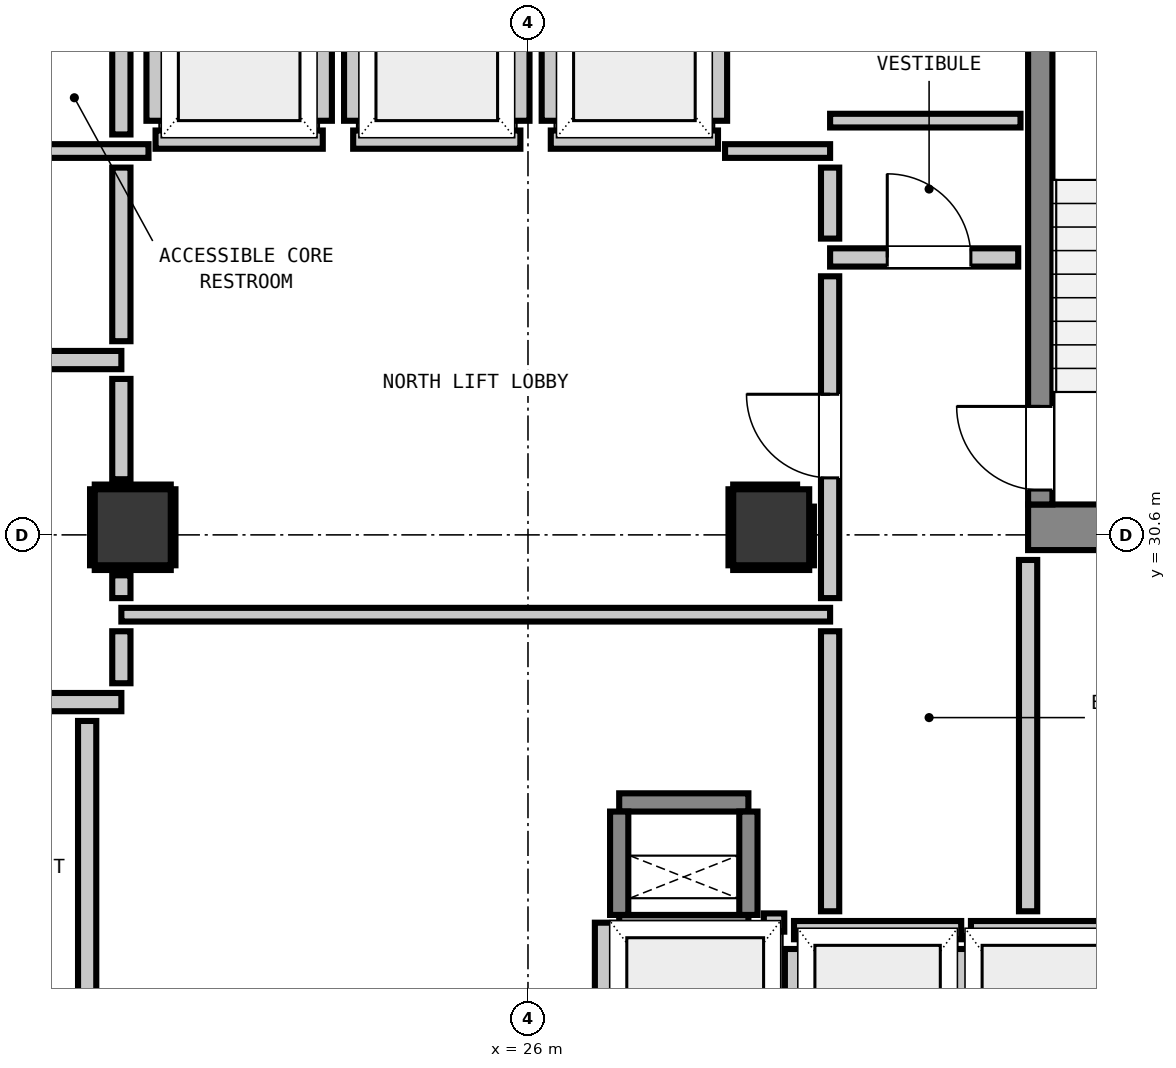
"""IFC4 building model, lengths in metres.
Left out: names, types, materials, properties, quantities, classifications, styles, units other than length and angle.
Written with IfcOpenShell. Run it as: python <this file> out.ifc"""

import sys

from ifc_helpers import new_model, si_unit, direction, frame, frame_2d, origin, origin_2d, place, context, subcontext, project, spatial, rectangle, extrude, element, fill, save


model = new_model("IFC4")
c1 = context("Model", 3, precision=1e-05, world=origin(), true_north=direction((0.0, 1.0)))
c2 = subcontext(c1, "Body", "Model", "MODEL_VIEW")
j1 = project(units=[si_unit("LENGTHUNIT", "METRE"), si_unit("PLANEANGLEUNIT", "RADIAN")], contexts=[c1])
p1 = place(None, origin())
s1 = spatial("IfcSite", under=j1, at=p1, CompositionType="ELEMENT")
p2 = place(p1, origin())
s2 = spatial("IfcBuilding", under=s1, at=p2, CompositionType="ELEMENT")
p3 = place(p2, frame((0.0, 0.0, 55.2)))
s3 = spatial("IfcBuildingStorey", under=s2, at=p3, CompositionType="ELEMENT", Elevation=55.2)
p4 = place(p3, frame((32.58, 30.7, 0.0), z_axis=(0.0, 0.0, 1.0), x_axis=(1.0, 0.0, 0.0)))
e1 = element("IfcWall", 1, at=p4, inside=s3, PredefinedType="SHEAR", context=c2, shape_type="SweptSolid", body=[
    extrude(rectangle(XDim=3.415, YDim=0.6, at=frame_2d((1.708, 0.0))), origin(), (0.0, 0.0, 1.0), 3.32),
])
p5 = place(p3, frame((32.74, 31.0, 0.0), z_axis=(0.0, 0.0, 1.0), x_axis=(0.0, 1.0, 0.0)))
e2 = element("IfcWall", 2, at=p5, inside=s3, PredefinedType="SHEAR", context=c2, shape_type="SweptSolid", body=[
    extrude(rectangle(XDim=7.8, YDim=0.32, at=frame_2d((3.9, 0.0))), origin(), (0.0, 0.0, 1.0), 3.32),
])
p6 = place(p5, frame((0.19, 0.0, 0.0)))
e3 = element("IfcOpeningElement", 3, at=p6, cuts=e2, PredefinedType="OPENING", context=c2, shape_type="SweptSolid", body=[
    extrude(rectangle(XDim=1.1, YDim=2.15, at=frame_2d((0.55, 1.075))), frame((0.0, 0.17, 0.0), z_axis=(0.0, -1.0, 0.0), x_axis=(1.0, 0.0, 0.0)), (0.0, 0.0, 1.0), 0.34),
])
for number, where, z_axis, x_axis in (
    (4, (27.2, 25.48, 0.0), (0.0, 0.0, 1.0), (1.0, 0.0, 0.0)),
    (5, (27.2, 27.08, 0.0), (0.0, 0.0, 1.0), (1.0, 0.0, 0.0)),
):
    element("IfcWall", number, at=place(p3, frame(where, z_axis=z_axis, x_axis=x_axis)), inside=s3, PredefinedType="SHEAR", context=c2, shape_type="SweptSolid", body=[
        extrude(rectangle(XDim=1.7, YDim=0.24, at=frame_2d((0.85, 0.0))), origin(), (0.0, 0.0, 1.0), 3.32),
    ])
for number, where, z_axis, x_axis in (
    (6, (27.2, 25.6, 0.0), (0.0, 0.0, 1.0), (0.0, 1.0, 0.0)),
    (7, (28.9, 25.6, 0.0), (0.0, 0.0, 1.0), (0.0, 1.0, 0.0)),
):
    element("IfcWall", number, at=place(p3, frame(where, z_axis=z_axis, x_axis=x_axis)), inside=s3, PredefinedType="SHEAR", context=c2, shape_type="SweptSolid", body=[
        extrude(rectangle(XDim=1.36, YDim=0.24, at=frame_2d((0.68, 0.0))), origin(), (0.0, 0.0, 1.0), 3.32),
    ])
for number, where, z_axis, x_axis in (
    (8, (20.8, 30.7, 0.0), (0.0, 0.0, 1.0), (1.0, 0.0, 0.0)),
    (9, (29.2, 30.7, 0.0), (0.0, 0.0, 1.0), (1.0, 0.0, 0.0)),
):
    element("IfcColumn", number, at=place(p3, frame(where, z_axis=z_axis, x_axis=x_axis)), inside=s3, PredefinedType="COLUMN", context=c2, shape_type="SweptSolid", body=[
        extrude(rectangle(XDim=1.0, YDim=1.0, at=origin_2d()), origin(), (0.0, 0.0, 1.0), 3.32),
    ])
p7 = place(p3, frame((21.1, 35.8, 0.0), z_axis=(0.0, 0.0, 1.0), x_axis=(1.0, 0.0, 0.0)))
e10 = element("IfcWall", 10, at=p7, inside=s3, PredefinedType="PARTITIONING", context=c2, shape_type="SweptSolid", body=[
    extrude(rectangle(XDim=2.2, YDim=0.24, at=frame_2d((1.1, 0.0))), origin(), (0.0, 0.0, 1.0), 3.06),
])
p8 = place(p3, frame((21.1, 36.048, 0.0), z_axis=(0.0, 0.0, 1.0), x_axis=(0.0, 1.0, 0.0)))
e11 = element("IfcWall", 11, at=p8, inside=s3, PredefinedType="PARTITIONING", context=c2, shape_type="SweptSolid", body=[
    extrude(rectangle(XDim=2.104, YDim=0.24, at=frame_2d((1.052, 0.0))), origin(), (0.0, 0.0, 1.0), 2.295),
])
p9 = place(p3, frame((23.3, 36.048, 0.0), z_axis=(0.0, 0.0, 1.0), x_axis=(0.0, 1.0, 0.0)))
e12 = element("IfcWall", 12, at=p9, inside=s3, PredefinedType="PARTITIONING", context=c2, shape_type="SweptSolid", body=[
    extrude(rectangle(XDim=2.104, YDim=0.24, at=frame_2d((1.052, 0.0))), origin(), (0.0, 0.0, 1.0), 3.06),
])
p10 = place(p3, frame((23.7, 35.8, 0.0), z_axis=(0.0, 0.0, 1.0), x_axis=(1.0, 0.0, 0.0)))
e13 = element("IfcWall", 13, at=p10, inside=s3, PredefinedType="PARTITIONING", context=c2, shape_type="SweptSolid", body=[
    extrude(rectangle(XDim=2.2, YDim=0.24, at=frame_2d((1.1, 0.0))), origin(), (0.0, 0.0, 1.0), 3.06),
])
for number, where, z_axis, x_axis in (
    (14, (23.7, 36.048, 0.0), (0.0, 0.0, 1.0), (0.0, 1.0, 0.0)),
    (15, (25.9, 36.048, 0.0), (0.0, 0.0, 1.0), (0.0, 1.0, 0.0)),
):
    element("IfcWall", number, at=place(p3, frame(where, z_axis=z_axis, x_axis=x_axis)), inside=s3, PredefinedType="PARTITIONING", context=c2, shape_type="SweptSolid", body=[
        extrude(rectangle(XDim=2.104, YDim=0.24, at=frame_2d((1.052, 0.0))), origin(), (0.0, 0.0, 1.0), 3.06),
    ])
p11 = place(p3, frame((26.3, 35.8, 0.0), z_axis=(0.0, 0.0, 1.0), x_axis=(1.0, 0.0, 0.0)))
e16 = element("IfcWall", 16, at=p11, inside=s3, PredefinedType="PARTITIONING", context=c2, shape_type="SweptSolid", body=[
    extrude(rectangle(XDim=2.2, YDim=0.24, at=frame_2d((1.1, 0.0))), origin(), (0.0, 0.0, 1.0), 3.06),
])
for number, where, z_axis, x_axis in (
    (17, (26.3, 36.048, 0.0), (0.0, 0.0, 1.0), (0.0, 1.0, 0.0)),
    (18, (28.5, 36.048, 0.0), (0.0, 0.0, 1.0), (0.0, 1.0, 0.0)),
):
    element("IfcWall", number, at=place(p3, frame(where, z_axis=z_axis, x_axis=x_axis)), inside=s3, PredefinedType="PARTITIONING", context=c2, shape_type="SweptSolid", body=[
        extrude(rectangle(XDim=2.104, YDim=0.24, at=frame_2d((1.052, 0.0))), origin(), (0.0, 0.0, 1.0), 3.06),
    ])
p12 = place(p3, frame((29.5, 25.4, 0.0), z_axis=(0.0, 0.0, 1.0), x_axis=(1.0, 0.0, 0.0)))
e19 = element("IfcWall", 19, at=p12, inside=s3, PredefinedType="PARTITIONING", context=c2, shape_type="SweptSolid", body=[
    extrude(rectangle(XDim=2.2, YDim=0.24, at=frame_2d((1.1, 0.0))), origin(), (0.0, 0.0, 1.0), 3.06),
])
p13 = place(p3, frame((29.5, 22.632, 0.0), z_axis=(0.0, 0.0, 1.0), x_axis=(0.0, 1.0, 0.0)))
e20 = element("IfcWall", 20, at=p13, inside=s3, PredefinedType="PARTITIONING", context=c2, shape_type="SweptSolid", body=[
    extrude(rectangle(XDim=2.52, YDim=0.24, at=frame_2d((1.26, 0.0))), origin(), (0.0, 0.0, 1.0), 2.295),
])
p14 = place(p3, frame((31.7, 22.73, 0.0), z_axis=(0.0, 0.0, 1.0), x_axis=(0.0, 1.0, 0.0)))
e21 = element("IfcWall", 21, at=p14, inside=s3, PredefinedType="PARTITIONING", context=c2, shape_type="SweptSolid", body=[
    extrude(rectangle(XDim=2.422, YDim=0.24, at=frame_2d((1.211, 0.0))), origin(), (0.0, 0.0, 1.0), 3.06),
])
p15 = place(p3, frame((31.828, 25.4, 0.0), z_axis=(0.0, 0.0, 1.0), x_axis=(1.0, 0.0, 0.0)))
e22 = element("IfcWall", 22, at=p15, inside=s3, PredefinedType="PARTITIONING", context=c2, shape_type="SweptSolid", body=[
    extrude(rectangle(XDim=2.072, YDim=0.24, at=frame_2d((1.036, 0.0))), origin(), (0.0, 0.0, 1.0), 3.06),
])
p16 = place(p3, frame((29.103, 25.5, 0.0), z_axis=(0.0, 0.0, 1.0), x_axis=(1.0, 0.0, 0.0)))
e23 = element("IfcWall", 23, at=p16, inside=s3, PredefinedType="PARTITIONING", context=c2, shape_type="SweptSolid", body=[
    extrude(rectangle(XDim=0.269, YDim=0.24, at=frame_2d((0.135, 0.0))), origin(), (0.0, 0.0, 1.0), 3.06),
])
p17 = place(p3, frame((27.0, 22.73, 0.0), z_axis=(0.0, 0.0, 1.0), x_axis=(0.0, 1.0, 0.0)))
e24 = element("IfcWall", 24, at=p17, inside=s3, PredefinedType="PARTITIONING", context=c2, shape_type="SweptSolid", body=[
    extrude(rectangle(XDim=2.768, YDim=0.24, at=frame_2d((1.384, 0.0))), origin(), (0.0, 0.0, 1.0), 3.06),
])
p18 = place(p3, frame((17.45, 28.4, 0.0), z_axis=(0.0, 0.0, 1.0), x_axis=(1.0, 0.0, 0.0)))
e25 = element("IfcWall", 25, at=p18, inside=s3, PredefinedType="PARTITIONING", context=c2, shape_type="SweptSolid", body=[
    extrude(rectangle(XDim=3.2, YDim=0.24, at=frame_2d((1.6, 0.0))), origin(), (0.0, 0.0, 1.0), 3.06),
])
p19 = place(p18, frame((0.784, 0.0, 0.0)))
e26 = element("IfcOpeningElement", 26, at=p19, cuts=e25, PredefinedType="OPENING", context=c2, shape_type="SweptSolid", body=[
    extrude(rectangle(XDim=1.1, YDim=2.15, at=frame_2d((0.55, 1.075))), frame((0.0, 0.13, 0.0), z_axis=(0.0, -1.0, 0.0), x_axis=(1.0, 0.0, 0.0)), (0.0, 0.0, 1.0), 0.26),
])
p20 = place(p3, frame((17.45, 32.9, 0.0), z_axis=(0.0, 0.0, 1.0), x_axis=(1.0, 0.0, 0.0)))
e27 = element("IfcWall", 27, at=p20, inside=s3, PredefinedType="PARTITIONING", context=c2, shape_type="SweptSolid", body=[
    extrude(rectangle(XDim=3.2, YDim=0.24, at=frame_2d((1.6, 0.0))), origin(), (0.0, 0.0, 1.0), 3.06),
])
p21 = place(p20, frame((0.159, 0.0, 0.0)))
e28 = element("IfcOpeningElement", 28, at=p21, cuts=e27, PredefinedType="OPENING", context=c2, shape_type="SweptSolid", body=[
    extrude(rectangle(XDim=1.1, YDim=2.15, at=frame_2d((0.55, 1.075))), frame((0.0, 0.13, 0.0), z_axis=(0.0, -1.0, 0.0), x_axis=(1.0, 0.0, 0.0)), (0.0, 0.0, 1.0), 0.26),
])
p22 = place(p3, frame((29.975, 34.25, 0.0), z_axis=(0.0, 0.0, 1.0), x_axis=(1.0, 0.0, 0.0)))
e29 = element("IfcWall", 29, at=p22, inside=s3, PredefinedType="PARTITIONING", context=c2, shape_type="SweptSolid", body=[
    extrude(rectangle(XDim=2.475, YDim=0.24, at=frame_2d((1.237, 0.0))), origin(), (0.0, 0.0, 1.0), 3.06),
])
p23 = place(p22, frame((0.752, 0.0, 0.0)))
e30 = element("IfcOpeningElement", 30, at=p23, cuts=e29, PredefinedType="OPENING", context=c2, shape_type="SweptSolid", body=[
    extrude(rectangle(XDim=1.1, YDim=2.15, at=frame_2d((0.55, 1.075))), frame((0.0, 0.13, 0.0), z_axis=(0.0, -1.0, 0.0), x_axis=(1.0, 0.0, 0.0)), (0.0, 0.0, 1.0), 0.26),
])
p24 = place(p3, frame((20.65, 29.55, 0.0), z_axis=(0.0, 0.0, 1.0), x_axis=(1.0, 0.0, 0.0)))
e31 = element("IfcWall", 31, at=p24, inside=s3, PredefinedType="PARTITIONING", context=c2, shape_type="SweptSolid", body=[
    extrude(rectangle(XDim=9.325, YDim=0.18, at=frame_2d((4.663, 0.0))), origin(), (0.0, 0.0, 1.0), 3.06),
])
p25 = place(p3, frame((18.95, 35.65, 0.0), z_axis=(0.0, 0.0, 1.0), x_axis=(1.0, 0.0, 0.0)))
e32 = element("IfcWall", 32, at=p25, inside=s3, PredefinedType="PARTITIONING", context=c2, shape_type="SweptSolid", body=[
    extrude(rectangle(XDim=2.057, YDim=0.18, at=frame_2d((1.029, 0.0))), origin(), (0.0, 0.0, 1.0), 3.06),
])
p26 = place(p3, frame((28.593, 35.65, 0.0), z_axis=(0.0, 0.0, 1.0), x_axis=(1.0, 0.0, 0.0)))
e33 = element("IfcWall", 33, at=p26, inside=s3, PredefinedType="PARTITIONING", context=c2, shape_type="SweptSolid", body=[
    extrude(rectangle(XDim=1.382, YDim=0.18, at=frame_2d((0.691, 0.0))), origin(), (0.0, 0.0, 1.0), 3.06),
])
p27 = place(p3, frame((29.975, 36.05, 0.0), z_axis=(0.0, 0.0, 1.0), x_axis=(1.0, 0.0, 0.0)))
e34 = element("IfcWall", 34, at=p27, inside=s3, PredefinedType="PARTITIONING", context=c2, shape_type="SweptSolid", body=[
    extrude(rectangle(XDim=2.505, YDim=0.18, at=frame_2d((1.252, 0.0))), origin(), (0.0, 0.0, 1.0), 3.06),
])
p28 = place(p3, frame((20.2, 22.586, 0.0), z_axis=(0.0, 0.0, 1.0), x_axis=(0.0, 1.0, 0.0)))
e35 = element("IfcWall", 35, at=p28, inside=s3, PredefinedType="PARTITIONING", context=c2, shape_type="SweptSolid", body=[
    extrude(rectangle(XDim=5.566, YDim=0.24, at=frame_2d((2.783, 0.0))), origin(), (0.0, 0.0, 1.0), 3.06),
])
p29 = place(p3, frame((20.65, 28.648, 0.0), z_axis=(0.0, 0.0, 1.0), x_axis=(0.0, 1.0, 0.0)))
e36 = element("IfcWall", 36, at=p29, inside=s3, PredefinedType="PARTITIONING", context=c2, shape_type="SweptSolid", body=[
    extrude(rectangle(XDim=0.684, YDim=0.24, at=frame_2d((0.342, 0.0))), origin(), (0.0, 0.0, 1.0), 2.295),
])
p30 = place(p3, frame((20.65, 29.768, 0.0), z_axis=(0.0, 0.0, 1.0), x_axis=(0.0, 1.0, 0.0)))
e37 = element("IfcWall", 37, at=p30, inside=s3, PredefinedType="PARTITIONING", context=c2, shape_type="SweptSolid", body=[
    extrude(rectangle(XDim=0.3, YDim=0.24, at=frame_2d((0.15, 0.0))), origin(), (0.0, 0.0, 1.0), 2.295),
])
p31 = place(p3, frame((20.65, 31.332, 0.0), z_axis=(0.0, 0.0, 1.0), x_axis=(0.0, 1.0, 0.0)))
e38 = element("IfcWall", 38, at=p31, inside=s3, PredefinedType="PARTITIONING", context=c2, shape_type="SweptSolid", body=[
    extrude(rectangle(XDim=1.32, YDim=0.24, at=frame_2d((0.66, 0.0))), origin(), (0.0, 0.0, 1.0), 2.295),
])
p32 = place(p3, frame((20.65, 33.148, 0.0), z_axis=(0.0, 0.0, 1.0), x_axis=(0.0, 1.0, 0.0)))
e39 = element("IfcWall", 39, at=p32, inside=s3, PredefinedType="PARTITIONING", context=c2, shape_type="SweptSolid", body=[
    extrude(rectangle(XDim=2.284, YDim=0.24, at=frame_2d((1.142, 0.0))), origin(), (0.0, 0.0, 1.0), 2.295),
])
p33 = place(p3, frame((20.65, 35.868, 0.0), z_axis=(0.0, 0.0, 1.0), x_axis=(0.0, 1.0, 0.0)))
e40 = element("IfcWall", 40, at=p33, inside=s3, PredefinedType="PARTITIONING", context=c2, shape_type="SweptSolid", body=[
    extrude(rectangle(XDim=2.684, YDim=0.24, at=frame_2d((1.342, 0.0))), origin(), (0.0, 0.0, 1.0), 2.295),
])
p34 = place(p3, frame((29.975, 25.648, 0.0), z_axis=(0.0, 0.0, 1.0), x_axis=(0.0, 1.0, 0.0)))
e41 = element("IfcWall", 41, at=p34, inside=s3, PredefinedType="PARTITIONING", context=c2, shape_type="SweptSolid", body=[
    extrude(rectangle(XDim=3.684, YDim=0.24, at=frame_2d((1.842, 0.0))), origin(), (0.0, 0.0, 1.0), 3.06),
])
p35 = place(p3, frame((29.975, 29.768, 0.0), z_axis=(0.0, 0.0, 1.0), x_axis=(0.0, 1.0, 0.0)))
e42 = element("IfcWall", 42, at=p35, inside=s3, PredefinedType="PARTITIONING", context=c2, shape_type="SweptSolid", body=[
    extrude(rectangle(XDim=4.234, YDim=0.24, at=frame_2d((2.117, 0.0))), origin(), (0.0, 0.0, 1.0), 3.06),
])
p36 = place(p35, frame((1.582, 0.0, 0.0)))
e43 = element("IfcOpeningElement", 43, at=p36, cuts=e42, PredefinedType="OPENING", context=c2, shape_type="SweptSolid", body=[
    extrude(rectangle(XDim=1.1, YDim=2.15, at=frame_2d((0.55, 1.075))), frame((0.0, 0.13, 0.0), z_axis=(0.0, -1.0, 0.0), x_axis=(1.0, 0.0, 0.0)), (0.0, 0.0, 1.0), 0.26),
])
p37 = place(p3, frame((29.975, 34.498, 0.0), z_axis=(0.0, 0.0, 1.0), x_axis=(0.0, 1.0, 0.0)))
e44 = element("IfcWall", 44, at=p37, inside=s3, PredefinedType="PARTITIONING", context=c2, shape_type="SweptSolid", body=[
    extrude(rectangle(XDim=0.934, YDim=0.24, at=frame_2d((0.467, 0.0))), origin(), (0.0, 0.0, 1.0), 3.06),
])
p38 = place(p3, frame((32.58, 25.648, 0.0), z_axis=(0.0, 0.0, 1.0), x_axis=(0.0, 1.0, 0.0)))
e45 = element("IfcWall", 45, at=p38, inside=s3, PredefinedType="PARTITIONING", context=c2, shape_type="SweptSolid", body=[
    extrude(rectangle(XDim=4.622, YDim=0.24, at=frame_2d((2.311, 0.0))), origin(), (0.0, 0.0, 1.0), 3.06),
])
for number, where, z_axis, x_axis in (
    (46, (20.3, 30.168, 0.0), (0.0, 0.0, 1.0), (1.0, 0.0, 0.0)),
    (47, (20.3, 31.232, 0.0), (0.0, 0.0, 1.0), (1.0, 0.0, 0.0)),
    (48, (20.268, 30.2, 0.0), (0.0, 0.0, 1.0), (0.0, 1.0, 0.0)),
    (49, (21.332, 30.2, 0.0), (0.0, 0.0, 1.0), (0.0, 1.0, 0.0)),
    (50, (28.7, 30.168, 0.0), (0.0, 0.0, 1.0), (1.0, 0.0, 0.0)),
):
    element("IfcWall", number, at=place(p3, frame(where, z_axis=z_axis, x_axis=x_axis)), inside=s3, PredefinedType="PARTITIONING", context=c2, shape_type="SweptSolid", body=[
        extrude(rectangle(XDim=1.0, YDim=0.06, at=frame_2d((0.5, 0.0))), origin(), (0.0, 0.0, 1.0), 1.45),
    ])
p39 = place(p3, frame((28.7, 31.232, 0.0), z_axis=(0.0, 0.0, 1.0), x_axis=(1.0, 0.0, 0.0)))
e51 = element("IfcWall", 51, at=p39, inside=s3, PredefinedType="PARTITIONING", context=c2, shape_type="SweptSolid", body=[
    extrude(rectangle(XDim=0.841, YDim=0.06, at=frame_2d((0.42, 0.0))), origin(), (0.0, 0.0, 1.0), 1.45),
])
p40 = place(p3, frame((28.668, 30.2, 0.0), z_axis=(0.0, 0.0, 1.0), x_axis=(0.0, 1.0, 0.0)))
e52 = element("IfcWall", 52, at=p40, inside=s3, PredefinedType="PARTITIONING", context=c2, shape_type="SweptSolid", body=[
    extrude(rectangle(XDim=1.0, YDim=0.06, at=frame_2d((0.5, 0.0))), origin(), (0.0, 0.0, 1.0), 1.45),
])
p41 = place(p3, frame((29.732, 30.2, 0.0), z_axis=(0.0, 0.0, 1.0), x_axis=(0.0, 1.0, 0.0)))
e53 = element("IfcWall", 53, at=p41, inside=s3, PredefinedType="PARTITIONING", context=c2, shape_type="SweptSolid", body=[
    extrude(rectangle(XDim=0.772, YDim=0.06, at=frame_2d((0.386, 0.0))), origin(), (0.0, 0.0, 1.0), 1.45),
])
p42 = place(p6, origin())
e54 = element("IfcDoor", 54, at=p42, inside=s3, OperationType="SINGLE_SWING_RIGHT", PredefinedType="DOOR", context=c2, shape_type="SweptSolid", body=[
    extrude(rectangle(XDim=1.1, YDim=2.15, at=frame_2d((0.55, 1.075))), frame((0.0, 0.025, 0.0), z_axis=(0.0, -1.0, 0.0), x_axis=(1.0, 0.0, 0.0)), (0.0, 0.0, 1.0), 0.05),
])
fill(e3, e54)
p43 = place(p36, origin())
e55 = element("IfcDoor", 55, at=p43, inside=s3, OperationType="SINGLE_SWING_RIGHT", PredefinedType="DOOR", context=c2, shape_type="SweptSolid", body=[
    extrude(rectangle(XDim=1.1, YDim=2.15, at=frame_2d((0.55, 1.075))), frame((0.0, 0.025, 0.0), z_axis=(0.0, -1.0, 0.0), x_axis=(1.0, 0.0, 0.0)), (0.0, 0.0, 1.0), 0.05),
])
fill(e43, e55)
p44 = place(p23, origin())
e56 = element("IfcDoor", 56, at=p44, inside=s3, OperationType="SINGLE_SWING_LEFT", PredefinedType="DOOR", context=c2, shape_type="SweptSolid", body=[
    extrude(rectangle(XDim=1.1, YDim=2.15, at=frame_2d((0.55, 1.075))), frame((0.0, 0.025, 0.0), z_axis=(0.0, -1.0, 0.0), x_axis=(1.0, 0.0, 0.0)), (0.0, 0.0, 1.0), 0.05),
])
fill(e30, e56)
save(model, sys.argv[1])
